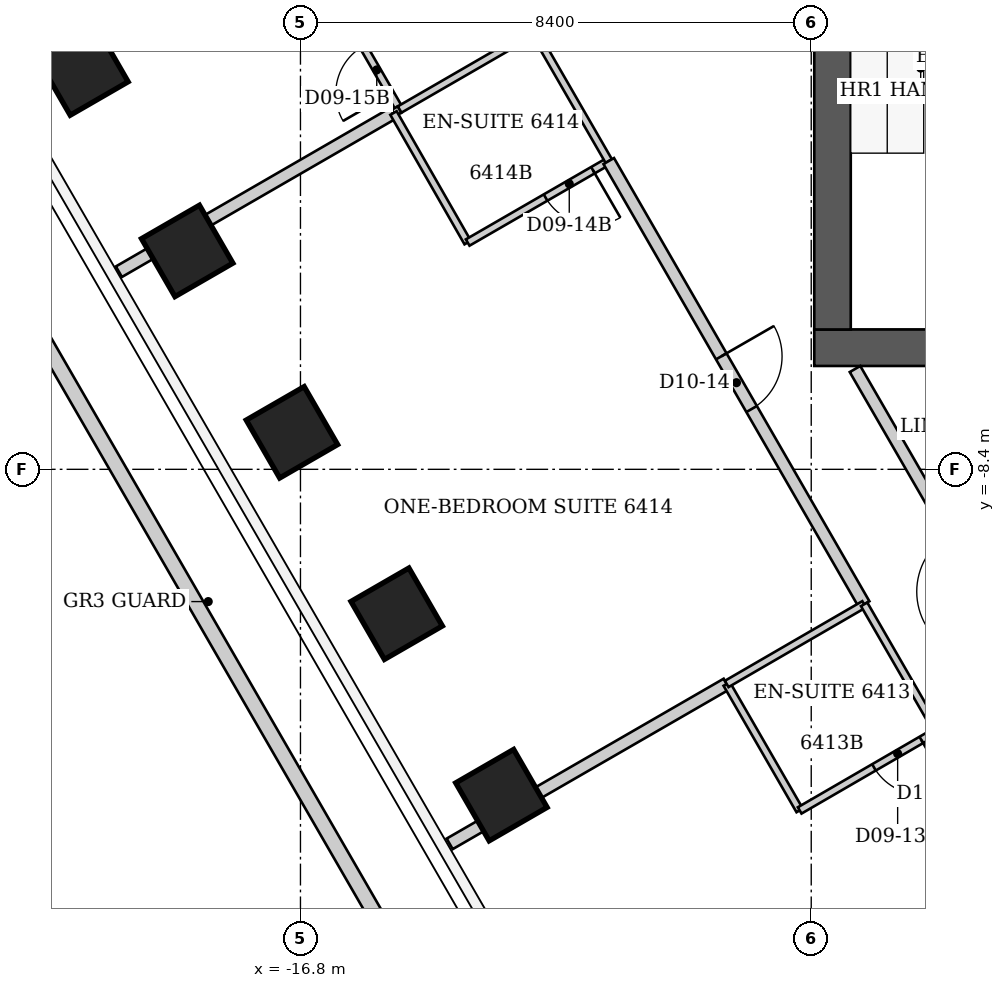
"""IFC4 building model, lengths in metres.
Left out: names, types, materials, properties, quantities, classifications, styles, units other than length and angle.
Written with IfcOpenShell. Run it as: python <this file> out.ifc"""

import sys

from ifc_helpers import new_model, si_unit, direction, frame, frame_2d, origin, origin_2d, place, context, subcontext, project, spatial, rectangle, extrude, clip, halfspace, element, fill, save


model = new_model("IFC4")
c1 = context("Model", 3, precision=1e-05, world=origin(), true_north=direction((0.0, 1.0)))
c2 = subcontext(c1, "Body", "Model", "MODEL_VIEW")
j1 = project(units=[si_unit("LENGTHUNIT", "METRE"), si_unit("PLANEANGLEUNIT", "RADIAN")], contexts=[c1])
p1 = place(None, origin())
s1 = spatial("IfcSite", under=j1, at=p1, CompositionType="ELEMENT")
p2 = place(p1, origin())
s2 = spatial("IfcBuilding", under=s1, at=p2, CompositionType="ELEMENT")
p3 = place(p2, frame((0.0, 0.0, 257.0)))
s3 = spatial("IfcBuildingStorey", under=s2, at=p3, CompositionType="ELEMENT", Elevation=257.0)
p4 = place(p3, frame((-13.495, -13.759, -0.052), z_axis=(0.0, 0.0, 1.0), x_axis=(-0.866025403784, -0.5, 0.0)))
e1 = element("IfcColumn", 1, at=p4, inside=s3, PredefinedType="COLUMN", context=c2, shape_type="SweptSolid", body=[
    clip(extrude(rectangle(XDim=1.1, YDim=1.1, at=origin_2d()), origin(), (0.0, 0.0, 1.0), 3.852), halfspace(frame((0.0, 0.0, 0.052)), True)),
])
for number, where, z_axis, x_axis in (
    (2, (-15.218, -10.775, -0.045), (0.0, 0.0, 1.0), (-0.866, -0.5, 0.0)),
    (3, (-16.94, -7.792, -0.045), (0.0, 0.0, 1.0), (-0.866, -0.5, 0.0)),
):
    element("IfcColumn", number, at=place(p3, frame(where, z_axis=z_axis, x_axis=x_axis)), inside=s3, PredefinedType="COLUMN", context=c2, shape_type="SweptSolid", body=[
        clip(extrude(rectangle(XDim=1.1, YDim=1.1, at=origin_2d()), origin(), (0.0, 0.0, 1.0), 3.845), halfspace(frame((0.0, 0.0, 0.045)), True)),
    ])
p5 = place(p3, frame((-18.663, -4.808, -0.052), z_axis=(0.0, 0.0, 1.0), x_axis=(-0.866025403784, -0.5, 0.0)))
e4 = element("IfcColumn", 4, at=p5, inside=s3, PredefinedType="COLUMN", context=c2, shape_type="SweptSolid", body=[
    clip(extrude(rectangle(XDim=1.1, YDim=1.1, at=origin_2d()), origin(), (0.0, 0.0, 1.0), 3.852), halfspace(frame((0.0, 0.0, 0.052)), True)),
])
p6 = place(p3, frame((-20.385, -1.824, -0.06), z_axis=(0.0, 0.0, 1.0), x_axis=(-0.866025403784, -0.5, 0.0)))
e5 = element("IfcColumn", 5, at=p6, inside=s3, PredefinedType="COLUMN", context=c2, shape_type="SweptSolid", body=[
    clip(extrude(rectangle(XDim=1.1, YDim=1.1, at=origin_2d()), origin(), (0.0, 0.0, 1.0), 3.86), halfspace(frame((0.0, 0.0, 0.06)), True)),
])
p7 = place(p3, frame((-8.35, -6.4, 0.0), z_axis=(0.0, 0.0, 1.0), x_axis=(1.0, 0.0, 0.0)))
e6 = element("IfcWall", 6, at=p7, inside=s3, PredefinedType="SHEAR", context=c2, shape_type="SweptSolid", body=[
    extrude(rectangle(XDim=16.7, YDim=0.6, at=frame_2d((8.35, 0.0))), origin(), (0.0, 0.0, 1.0), 3.8),
])
p8 = place(p3, frame((-8.05, -6.1, 0.0), z_axis=(0.0, 0.0, 1.0), x_axis=(0.0, 1.0, 0.0)))
e7 = element("IfcWall", 7, at=p8, inside=s3, PredefinedType="SHEAR", context=c2, shape_type="SweptSolid", body=[
    extrude(rectangle(XDim=12.2, YDim=0.6, at=frame_2d((6.1, 0.0))), origin(), (0.0, 0.0, 1.0), 3.8),
])
p9 = place(p8, frame((7.6, 0.0, 0.0)))
e8 = element("IfcOpeningElement", 8, at=p9, cuts=e7, PredefinedType="OPENING", context=c2, shape_type="SweptSolid", body=[
    extrude(rectangle(XDim=1.2, YDim=2.2, at=frame_2d((0.6, 1.1))), frame((0.0, 0.3, 0.0), z_axis=(0.0, -1.0, 0.0), x_axis=(1.0, 0.0, 0.0)), (0.0, 0.0, 1.0), 0.6),
])
p10 = place(p3, frame((-27.219, 4.456, 0.0), z_axis=(0.0, 0.0, 1.0), x_axis=(0.499998496786, -0.866026271663, 0.0)))
e9 = element("IfcWall", 9, at=p10, inside=s3, PredefinedType="PARAPET", context=c2, shape_type="SweptSolid", body=[
    extrude(rectangle(XDim=34.936, YDim=0.25, at=frame_2d((17.468, 0.0))), origin(), (0.0, 0.0, 1.0), 1.1),
])
p11 = place(p3, frame((-19.786, -5.15, 0.0), z_axis=(0.0, 0.0, 1.0), x_axis=(0.865819112627, 0.500357136663, 0.0)))
e10 = element("IfcWall", 10, at=p11, inside=s3, PredefinedType="PARTITIONING", context=c2, shape_type="SweptSolid", body=[
    extrude(rectangle(XDim=5.216, YDim=0.2, at=frame_2d((2.608, 0.0))), origin(), (0.0, 0.0, 1.0), 3.64),
])
p12 = place(p3, frame((-16.47, -0.23, 0.0), z_axis=(0.0, 0.0, 1.0), x_axis=(0.500291685314, -0.865856933682, 0.0)))
e11 = element("IfcWall", 11, at=p12, inside=s3, PredefinedType="PARTITIONING", context=c2, shape_type="SweptSolid", body=[
    extrude(rectangle(XDim=2.599, YDim=0.12, at=frame_2d((1.299, 0.0))), origin(), (0.0, 0.0, 1.0), 3.64),
])
p13 = place(p12, frame((1.399, 0.0, 0.0)))
e12 = element("IfcOpeningElement", 12, at=p13, cuts=e11, PredefinedType="OPENING", context=c2, shape_type="SweptSolid", body=[
    extrude(rectangle(XDim=0.9, YDim=2.03, at=frame_2d((0.45, 1.015))), frame((0.0, 0.06, 0.0), z_axis=(0.0, -1.0, 0.0), x_axis=(1.0, 0.0, 0.0)), (0.0, 0.0, 1.0), 0.12),
])
p14 = place(p3, frame((-15.27, -2.54, 0.0), z_axis=(0.0, 0.0, 1.0), x_axis=(0.864612942288, 0.502438513678, 0.0)))
e13 = element("IfcWall", 13, at=p14, inside=s3, PredefinedType="PARTITIONING", context=c2, shape_type="SweptSolid", body=[
    extrude(rectangle(XDim=0.117, YDim=0.12, at=frame_2d((0.058, 0.0))), origin(), (0.0, 0.0, 1.0), 3.64),
])
p15 = place(p3, frame((-15.27, -2.54, 0.0), z_axis=(0.0, 0.0, 1.0), x_axis=(0.497027744361, -0.86773464915, 0.0)))
e14 = element("IfcWall", 14, at=p15, inside=s3, PredefinedType="PARTITIONING", context=c2, shape_type="SweptSolid", body=[
    extrude(rectangle(XDim=2.455, YDim=0.12, at=frame_2d((1.227, 0.0))), origin(), (0.0, 0.0, 1.0), 3.64),
])
p16 = place(p3, frame((-15.169, -2.482, 0.0), z_axis=(0.0, 0.0, 1.0), x_axis=(0.865723129019, 0.500523190154, 0.0)))
e15 = element("IfcWall", 15, at=p16, inside=s3, PredefinedType="PARTITIONING", context=c2, shape_type="SweptSolid", body=[
    extrude(rectangle(XDim=2.401, YDim=0.12, at=frame_2d((1.201, 0.0))), origin(), (0.0, 0.0, 1.0), 3.64),
])
p17 = place(p3, frame((-14.346, -14.56, 0.0), z_axis=(0.0, 0.0, 1.0), x_axis=(0.8660557602, 0.49994741746, 0.0)))
e16 = element("IfcWall", 16, at=p17, inside=s3, PredefinedType="PARTITIONING", context=c2, shape_type="SweptSolid", body=[
    extrude(rectangle(XDim=5.261, YDim=0.2, at=frame_2d((2.63, 0.0))), origin(), (0.0, 0.0, 1.0), 3.64),
])
p18 = place(p3, frame((-14.05, -4.67, 0.0), z_axis=(0.0, 0.0, 1.0), x_axis=(0.865968562295, 0.500098439427, 0.0)))
e17 = element("IfcWall", 17, at=p18, inside=s3, PredefinedType="PARTITIONING", context=c2, shape_type="SweptSolid", body=[
    extrude(rectangle(XDim=2.679, YDim=0.12, at=frame_2d((1.34, 0.0))), origin(), (0.0, 0.0, 1.0), 3.64),
])
p19 = place(p18, frame((1.479, 0.0, 0.0)))
e18 = element("IfcOpeningElement", 18, at=p19, cuts=e17, PredefinedType="OPENING", context=c2, shape_type="SweptSolid", body=[
    extrude(rectangle(XDim=0.9, YDim=2.03, at=frame_2d((0.45, 1.015))), frame((0.0, 0.06, 0.0), z_axis=(0.0, -1.0, 0.0), x_axis=(1.0, 0.0, 0.0)), (0.0, 0.0, 1.0), 0.12),
])
p20 = place(p3, frame((-12.955, -1.207, 0.0), z_axis=(0.0, 0.0, 1.0), x_axis=(0.499920767294, -0.866071143976, 0.0)))
e19 = element("IfcWall", 19, at=p20, inside=s3, PredefinedType="PARTITIONING", context=c2, shape_type="SweptSolid", body=[
    extrude(rectangle(XDim=2.451, YDim=0.12, at=frame_2d((1.226, 0.0))), origin(), (0.0, 0.0, 1.0), 3.64),
])
p21 = place(p3, frame((-11.73, -3.33, 0.0), z_axis=(0.0, 0.0, 1.0), x_axis=(0.499214067722, -0.866478686748, 0.0)))
e20 = element("IfcWall", 20, at=p21, inside=s3, PredefinedType="PARTITIONING", context=c2, shape_type="SweptSolid", body=[
    extrude(rectangle(XDim=8.413, YDim=0.2, at=frame_2d((4.207, 0.0))), origin(), (0.0, 0.0, 1.0), 3.64),
])
p22 = place(p21, frame((3.707, 0.0, 0.0)))
e21 = element("IfcOpeningElement", 21, at=p22, cuts=e20, PredefinedType="OPENING", context=c2, shape_type="SweptSolid", body=[
    extrude(rectangle(XDim=1.0, YDim=2.13, at=frame_2d((0.5, 1.065))), frame((0.0, 0.1, 0.0), z_axis=(0.0, -1.0, 0.0), x_axis=(1.0, 0.0, 0.0)), (0.0, 0.0, 1.0), 0.2),
])
p23 = place(p3, frame((-9.79, -11.93, 0.0), z_axis=(0.0, 0.0, 1.0), x_axis=(0.499693115345, -0.866202511239, 0.0)))
e22 = element("IfcWall", 22, at=p23, inside=s3, PredefinedType="PARTITIONING", context=c2, shape_type="SweptSolid", body=[
    extrude(rectangle(XDim=2.401, YDim=0.12, at=frame_2d((1.201, 0.0))), origin(), (0.0, 0.0, 1.0), 3.64),
])
p24 = place(p3, frame((-9.79, -11.93, 0.0), z_axis=(0.0, 0.0, 1.0), x_axis=(0.865195830568, 0.501434118073, 0.0)))
e23 = element("IfcWall", 23, at=p24, inside=s3, PredefinedType="PARTITIONING", context=c2, shape_type="SweptSolid", body=[
    extrude(rectangle(XDim=2.612, YDim=0.12, at=frame_2d((1.306, 0.0))), origin(), (0.0, 0.0, 1.0), 3.64),
])
p25 = place(p3, frame((-8.59, -14.01, 0.0), z_axis=(0.0, 0.0, 1.0), x_axis=(0.865155281359, 0.50150407689, 0.0)))
e24 = element("IfcWall", 24, at=p25, inside=s3, PredefinedType="PARTITIONING", context=c2, shape_type="SweptSolid", body=[
    extrude(rectangle(XDim=2.612, YDim=0.12, at=frame_2d((1.306, 0.0))), origin(), (0.0, 0.0, 1.0), 3.64),
])
p26 = place(p25, frame((1.412, 0.0, 0.0)))
e25 = element("IfcOpeningElement", 25, at=p26, cuts=e24, PredefinedType="OPENING", context=c2, shape_type="SweptSolid", body=[
    extrude(rectangle(XDim=0.9, YDim=2.03, at=frame_2d((0.45, 1.015))), frame((0.0, 0.06, 0.0), z_axis=(0.0, -1.0, 0.0), x_axis=(1.0, 0.0, 0.0)), (0.0, 0.0, 1.0), 0.12),
])
p27 = place(p3, frame((-8.45, -24.382, 0.0), z_axis=(0.0, 0.0, 1.0), x_axis=(0.327680470733, 0.944788605509, 0.0)))
e26 = element("IfcWall", 26, at=p27, inside=s3, PredefinedType="PARTITIONING", context=c2, shape_type="SweptSolid", body=[
    extrude(rectangle(XDim=10.078, YDim=0.15, at=frame_2d((5.039, 0.0))), origin(), (0.0, 0.0, 1.0), 3.64),
])
p28 = place(p3, frame((-7.53, -10.62, 0.0), z_axis=(0.0, 0.0, 1.0), x_axis=(0.499737123639, -0.866177122335, 0.0)))
e27 = element("IfcWall", 27, at=p28, inside=s3, PredefinedType="PARTITIONING", context=c2, shape_type="SweptSolid", body=[
    extrude(rectangle(XDim=2.401, YDim=0.12, at=frame_2d((1.201, 0.0))), origin(), (0.0, 0.0, 1.0), 3.64),
])
p29 = place(p3, frame((-4.0, -13.12, 0.0), z_axis=(0.0, 0.0, 1.0), x_axis=(-0.500218436225, 0.865899252835, 0.0)))
e28 = element("IfcWall", 28, at=p29, inside=s3, PredefinedType="PARTITIONING", context=c2, shape_type="SweptSolid", body=[
    extrude(rectangle(XDim=7.357, YDim=0.2, at=frame_2d((3.678, 0.0))), origin(), (0.0, 0.0, 1.0), 3.64),
])
p30 = place(p29, frame((3.128, 0.0, 0.0)))
e29 = element("IfcOpeningElement", 29, at=p30, cuts=e28, PredefinedType="OPENING", context=c2, shape_type="SweptSolid", body=[
    extrude(rectangle(XDim=1.1, YDim=2.2, at=frame_2d((0.55, 1.1))), frame((0.0, 0.1, 0.0), z_axis=(0.0, -1.0, 0.0), x_axis=(1.0, 0.0, 0.0)), (0.0, 0.0, 1.0), 0.2),
])
p31 = place(p26, origin())
e30 = element("IfcDoor", 30, at=p31, inside=s3, OperationType="SINGLE_SWING_RIGHT", PredefinedType="DOOR", context=c2, shape_type="SweptSolid", body=[
    extrude(rectangle(XDim=0.9, YDim=2.03, at=frame_2d((0.45, 1.015))), frame((0.0, 0.025, 0.0), z_axis=(0.0, -1.0, 0.0), x_axis=(1.0, 0.0, 0.0)), (0.0, 0.0, 1.0), 0.05),
])
fill(e25, e30)
p32 = place(p22, origin())
e31 = element("IfcDoor", 31, at=p32, inside=s3, OperationType="SINGLE_SWING_LEFT", PredefinedType="DOOR", context=c2, shape_type="SweptSolid", body=[
    extrude(rectangle(XDim=1.0, YDim=2.13, at=frame_2d((0.5, 1.065))), frame((0.0, 0.025, 0.0), z_axis=(0.0, -1.0, 0.0), x_axis=(1.0, 0.0, 0.0)), (0.0, 0.0, 1.0), 0.05),
])
fill(e21, e31)
p33 = place(p19, origin())
e32 = element("IfcDoor", 32, at=p33, inside=s3, OperationType="SINGLE_SWING_RIGHT", PredefinedType="DOOR", context=c2, shape_type="SweptSolid", body=[
    extrude(rectangle(XDim=0.9, YDim=2.03, at=frame_2d((0.45, 1.015))), frame((0.0, 0.025, 0.0), z_axis=(0.0, -1.0, 0.0), x_axis=(1.0, 0.0, 0.0)), (0.0, 0.0, 1.0), 0.05),
])
fill(e18, e32)
p34 = place(p13, origin())
e33 = element("IfcDoor", 33, at=p34, inside=s3, OperationType="SINGLE_SWING_RIGHT", PredefinedType="DOOR", context=c2, shape_type="SweptSolid", body=[
    extrude(rectangle(XDim=0.9, YDim=2.03, at=frame_2d((0.45, 1.015))), frame((0.0, 0.025, 0.0), z_axis=(0.0, -1.0, 0.0), x_axis=(1.0, 0.0, 0.0)), (0.0, 0.0, 1.0), 0.05),
])
fill(e12, e33)
save(model, sys.argv[1])
